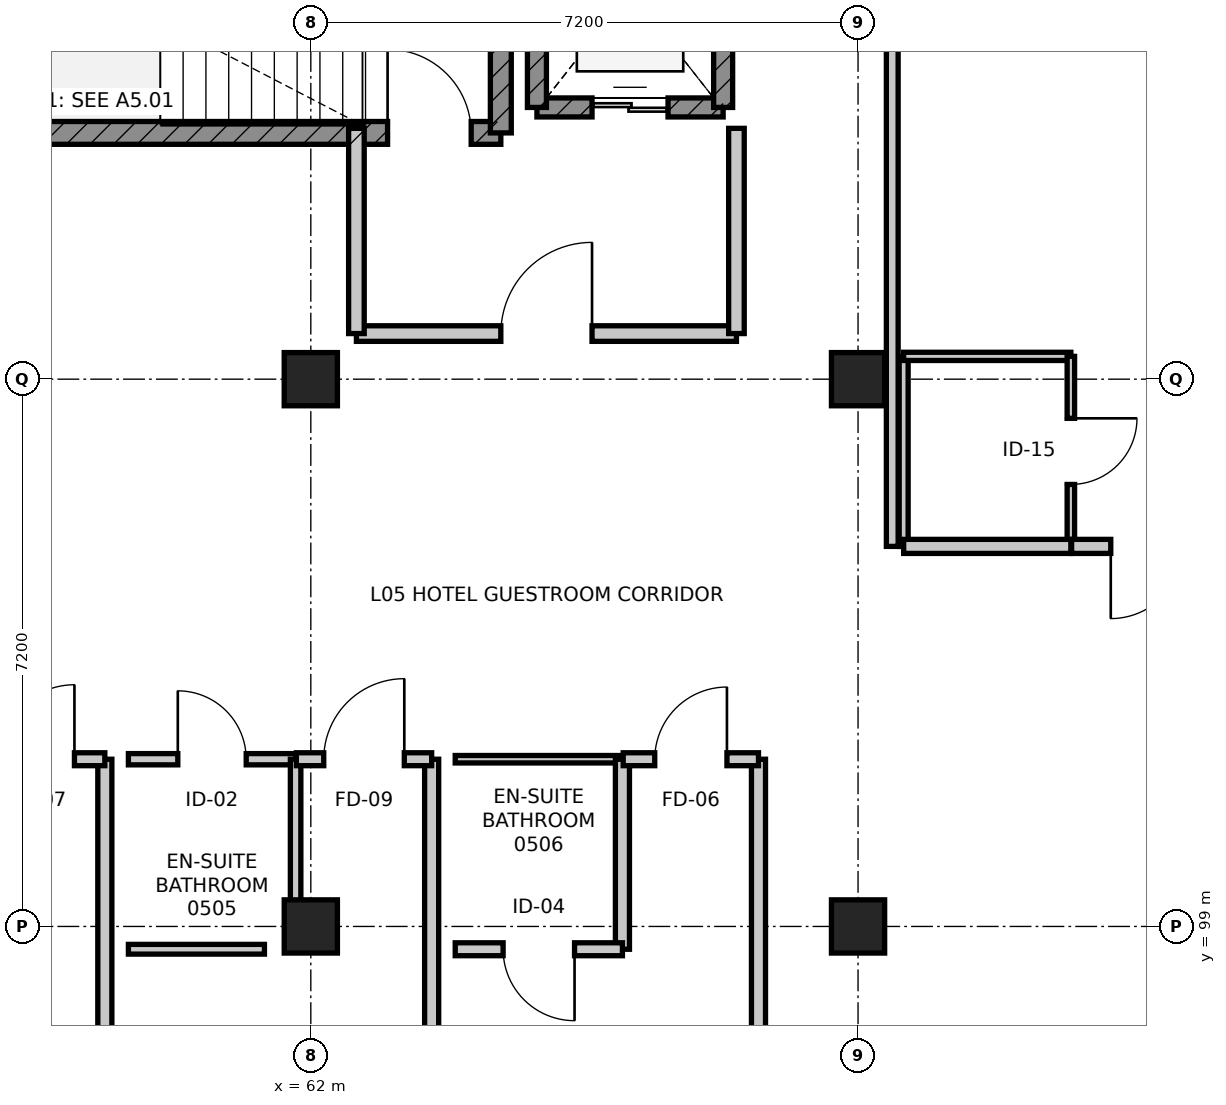
"""IFC4 building model, lengths in metres.
Left out: names, types, materials, properties, quantities, classifications, styles, units other than length and angle.
Written with IfcOpenShell. Run it as: python <this file> out.ifc"""

import sys

from ifc_helpers import new_model, si_unit, direction, frame, frame_2d, origin, origin_2d, place, context, subcontext, project, spatial, rectangle, extrude, element, fill, save


model = new_model("IFC4")
c1 = context("Model", 3, precision=1e-05, world=origin(), true_north=direction((0.0, 1.0)))
c2 = subcontext(c1, "Body", "Model", "MODEL_VIEW")
j1 = project(units=[si_unit("LENGTHUNIT", "METRE"), si_unit("PLANEANGLEUNIT", "RADIAN")], contexts=[c1])
p1 = place(None, origin())
s1 = spatial("IfcSite", under=j1, at=p1, CompositionType="ELEMENT")
p2 = place(p1, origin())
s2 = spatial("IfcBuilding", under=s1, at=p2, CompositionType="ELEMENT")
p3 = place(p2, frame((0.0, 0.0, 22.8)))
s3 = spatial("IfcBuildingStorey", under=s2, at=p3, CompositionType="ELEMENT", Elevation=22.8)
for number, where, z_axis, x_axis in (
    (1, (62.0, 99.0, 0.0), (0.0, 0.0, 1.0), (1.0, 0.0, 0.0)),
    (2, (62.0, 106.2, 0.0), (0.0, 0.0, 1.0), (1.0, 0.0, 0.0)),
    (3, (69.2, 99.0, 0.0), (0.0, 0.0, 1.0), (1.0, 0.0, 0.0)),
    (4, (69.2, 106.2, 0.0), (0.0, 0.0, 1.0), (1.0, 0.0, 0.0)),
):
    element("IfcColumn", number, at=place(p3, frame(where, z_axis=z_axis, x_axis=x_axis)), inside=s3, PredefinedType="COLUMN", context=c2, shape_type="SweptSolid", body=[
        extrude(rectangle(XDim=0.7, YDim=0.7, at=origin_2d()), origin(), (0.0, 0.0, 1.0), 3.6),
    ])
p4 = place(p3, frame((56.1, 109.44, 0.0), z_axis=(0.0, 0.0, 1.0), x_axis=(1.0, 0.0, 0.0)))
e5 = element("IfcWall", 5, at=p4, inside=s3, PredefinedType="SHEAR", context=c2, shape_type="SweptSolid", body=[
    extrude(rectangle(XDim=8.4, YDim=0.3, at=frame_2d((4.2, 0.0))), origin(), (0.0, 0.0, 1.0), 3.35),
])
p5 = place(p4, frame((6.91, 0.0, 0.0)))
e6 = element("IfcOpeningElement", 6, at=p5, cuts=e5, PredefinedType="OPENING", context=c2, shape_type="SweptSolid", body=[
    extrude(rectangle(XDim=1.1, YDim=2.1, at=frame_2d((0.55, 1.05))), frame((0.0, 0.16, 0.0), z_axis=(0.0, -1.0, 0.0), x_axis=(1.0, 0.0, 0.0)), (0.0, 0.0, 1.0), 0.32),
])
p6 = place(p3, frame((64.5, 109.44, 0.0), z_axis=(0.0, 0.0, 1.0), x_axis=(0.0, 1.0, 0.0)))
e7 = element("IfcWall", 7, at=p6, inside=s3, PredefinedType="SHEAR", context=c2, shape_type="SweptSolid", body=[
    extrude(rectangle(XDim=3.56, YDim=0.275, at=frame_2d((1.78, 0.0))), origin(), (0.0, 0.0, 1.0), 3.35),
])
p7 = place(p3, frame((64.975, 109.775, 0.0), z_axis=(0.0, 0.0, 1.0), x_axis=(1.0, 0.0, 0.0)))
e8 = element("IfcWall", 8, at=p7, inside=s3, PredefinedType="SHEAR", context=c2, shape_type="SweptSolid", body=[
    extrude(rectangle(XDim=2.45, YDim=0.25, at=frame_2d((1.225, 0.0))), origin(), (0.0, 0.0, 1.0), 3.35),
])
p8 = place(p7, frame((0.725, 0.0, 0.0)))
e9 = element("IfcOpeningElement", 9, at=p8, cuts=e8, PredefinedType="OPENING", context=c2, shape_type="SweptSolid", body=[
    extrude(rectangle(XDim=1.0, YDim=2.15, at=frame_2d((0.5, 1.075))), frame((0.0, 0.135, 0.0), z_axis=(0.0, -1.0, 0.0), x_axis=(1.0, 0.0, 0.0)), (0.0, 0.0, 1.0), 0.27),
])
for number, where, z_axis, x_axis in (
    (10, (67.425, 109.775, 0.0), (0.0, 0.0, 1.0), (0.0, 1.0, 0.0)),
    (11, (64.975, 112.825, 0.0), (0.0, 0.0, 1.0), (0.0, -1.0, 0.0)),
):
    element("IfcWall", number, at=place(p3, frame(where, z_axis=z_axis, x_axis=x_axis)), inside=s3, PredefinedType="SHEAR", context=c2, shape_type="SweptSolid", body=[
        extrude(rectangle(XDim=3.05, YDim=0.25, at=frame_2d((1.525, 0.0))), origin(), (0.0, 0.0, 1.0), 3.35),
    ])
p9 = place(p3, frame((62.6, 106.8, 0.0), z_axis=(0.0, 0.0, 1.0), x_axis=(1.0, 0.0, 0.0)))
e12 = element("IfcWall", 12, at=p9, inside=s3, PredefinedType="PARTITIONING", context=c2, shape_type="SweptSolid", body=[
    extrude(rectangle(XDim=5.0, YDim=0.205, at=frame_2d((2.5, 0.0))), origin(), (0.0, 0.0, 1.0), 3.35),
])
p10 = place(p9, frame((1.9, 0.0, 0.0)))
e13 = element("IfcOpeningElement", 13, at=p10, cuts=e12, PredefinedType="OPENING", context=c2, shape_type="SweptSolid", body=[
    extrude(rectangle(XDim=1.2, YDim=2.1, at=frame_2d((0.6, 1.05))), frame((0.0, 0.113, 0.0), z_axis=(0.0, -1.0, 0.0), x_axis=(1.0, 0.0, 0.0)), (0.0, 0.0, 1.0), 0.225),
])
for number, where, z_axis, x_axis in (
    (14, (67.6, 106.8, 0.0), (0.0, 0.0, 1.0), (0.0, 1.0, 0.0)),
    (15, (62.6, 109.5, 0.0), (0.0, 0.0, 1.0), (0.0, -1.0, 0.0)),
):
    element("IfcWall", number, at=place(p3, frame(where, z_axis=z_axis, x_axis=x_axis)), inside=s3, PredefinedType="PARTITIONING", context=c2, shape_type="SweptSolid", body=[
        extrude(rectangle(XDim=2.7, YDim=0.205, at=frame_2d((1.35, 0.0))), origin(), (0.0, 0.0, 1.0), 3.35),
    ])
p11 = place(p3, frame((59.29, 101.2, 0.0), z_axis=(0.0, 0.0, 1.0), x_axis=(0.0, -1.0, 0.0)))
e16 = element("IfcWall", 16, at=p11, inside=s3, PredefinedType="PARTITIONING", context=c2, shape_type="SweptSolid", body=[
    extrude(rectangle(XDim=9.24, YDim=0.185, at=frame_2d((4.62, 0.0))), origin(), (0.0, 0.0, 1.0), 2.735),
])
p12 = place(p3, frame((57.51, 101.2, 0.0), z_axis=(0.0, 0.0, 1.0), x_axis=(1.0, 0.0, 0.0)))
e17 = element("IfcWall", 17, at=p12, inside=s3, PredefinedType="PARTITIONING", context=c2, shape_type="SweptSolid", body=[
    extrude(rectangle(XDim=1.78, YDim=0.17, at=frame_2d((0.89, 0.0))), origin(), (0.0, 0.0, 1.0), 3.35),
])
p13 = place(p12, frame((0.4, 0.0, 0.0)))
e18 = element("IfcOpeningElement", 18, at=p13, cuts=e17, PredefinedType="OPENING", context=c2, shape_type="SweptSolid", body=[
    extrude(rectangle(XDim=0.98, YDim=2.15, at=frame_2d((0.49, 1.075))), frame((0.0, 0.095, 0.0), z_axis=(0.0, -1.0, 0.0), x_axis=(1.0, 0.0, 0.0)), (0.0, 0.0, 1.0), 0.19),
])
p14 = place(p3, frame((59.6, 101.2, 0.0), z_axis=(0.0, 0.0, 1.0), x_axis=(1.0, 0.0, 0.0)))
e19 = element("IfcWall", 19, at=p14, inside=s3, PredefinedType="PARTITIONING", context=c2, shape_type="SweptSolid", body=[
    extrude(rectangle(XDim=2.2, YDim=0.148, at=frame_2d((1.1, 0.0))), origin(), (0.0, 0.0, 1.0), 2.685),
])
p15 = place(p14, frame((0.65, 0.0, 0.0)))
e20 = element("IfcOpeningElement", 20, at=p15, cuts=e19, PredefinedType="OPENING", context=c2, shape_type="SweptSolid", body=[
    extrude(rectangle(XDim=0.9, YDim=2.08, at=frame_2d((0.45, 1.04))), frame((0.0, 0.084, 0.0), z_axis=(0.0, -1.0, 0.0), x_axis=(1.0, 0.0, 0.0)), (0.0, 0.0, 1.0), 0.168),
])
p16 = place(p3, frame((61.8, 101.2, 0.0), z_axis=(0.0, 0.0, 1.0), x_axis=(0.0, -1.0, 0.0)))
e21 = element("IfcWall", 21, at=p16, inside=s3, PredefinedType="PARTITIONING", context=c2, shape_type="SweptSolid", body=[
    extrude(rectangle(XDim=2.09, YDim=0.138, at=frame_2d((1.045, 0.0))), origin(), (0.0, 0.0, 1.0), 2.685),
])
p17 = place(p3, frame((61.39, 98.7, 0.0), z_axis=(0.0, 0.0, 1.0), x_axis=(-1.0, 0.0, 0.0)))
e22 = element("IfcWall", 22, at=p17, inside=s3, PredefinedType="PARTITIONING", context=c2, shape_type="SweptSolid", body=[
    extrude(rectangle(XDim=1.79, YDim=0.128, at=frame_2d((0.895, 0.0))), origin(), (0.0, 0.0, 1.0), 3.35),
])
p18 = place(p3, frame((63.59, 101.2, 0.0), z_axis=(0.0, 0.0, 1.0), x_axis=(0.0, -1.0, 0.0)))
e23 = element("IfcWall", 23, at=p18, inside=s3, PredefinedType="PARTITIONING", context=c2, shape_type="SweptSolid", body=[
    extrude(rectangle(XDim=9.24, YDim=0.185, at=frame_2d((4.62, 0.0))), origin(), (0.0, 0.0, 1.0), 2.735),
])
p19 = place(p3, frame((61.81, 101.2, 0.0), z_axis=(0.0, 0.0, 1.0), x_axis=(1.0, 0.0, 0.0)))
e24 = element("IfcWall", 24, at=p19, inside=s3, PredefinedType="PARTITIONING", context=c2, shape_type="SweptSolid", body=[
    extrude(rectangle(XDim=1.78, YDim=0.17, at=frame_2d((0.89, 0.0))), origin(), (0.0, 0.0, 1.0), 2.685),
])
p20 = place(p19, frame((0.36, 0.0, 0.0)))
e25 = element("IfcOpeningElement", 25, at=p20, cuts=e24, PredefinedType="OPENING", context=c2, shape_type="SweptSolid", body=[
    extrude(rectangle(XDim=1.06, YDim=2.2, at=frame_2d((0.53, 1.1))), frame((0.0, 0.095, 0.0), z_axis=(0.0, -1.0, 0.0), x_axis=(1.0, 0.0, 0.0)), (0.0, 0.0, 1.0), 0.19),
])
p21 = place(p3, frame((63.9, 101.2, 0.0), z_axis=(0.0, 0.0, 1.0), x_axis=(1.0, 0.0, 0.0)))
e26 = element("IfcWall", 26, at=p21, inside=s3, PredefinedType="PARTITIONING", context=c2, shape_type="SweptSolid", body=[
    extrude(rectangle(XDim=2.2, YDim=0.098, at=frame_2d((1.1, 0.0))), origin(), (0.0, 0.0, 1.0), 3.35),
])
p22 = place(p3, frame((66.1, 101.2, 0.0), z_axis=(0.0, 0.0, 1.0), x_axis=(0.0, -1.0, 0.0)))
e27 = element("IfcWall", 27, at=p22, inside=s3, PredefinedType="PARTITIONING", context=c2, shape_type="SweptSolid", body=[
    extrude(rectangle(XDim=2.5, YDim=0.185, at=frame_2d((1.25, 0.0))), origin(), (0.0, 0.0, 1.0), 2.735),
])
p23 = place(p3, frame((66.1, 98.7, 0.0), z_axis=(0.0, 0.0, 1.0), x_axis=(-1.0, 0.0, 0.0)))
e28 = element("IfcWall", 28, at=p23, inside=s3, PredefinedType="PARTITIONING", context=c2, shape_type="SweptSolid", body=[
    extrude(rectangle(XDim=2.2, YDim=0.17, at=frame_2d((1.1, 0.0))), origin(), (0.0, 0.0, 1.0), 2.735),
])
p24 = place(p23, frame((0.63, 0.0, 0.0)))
e29 = element("IfcOpeningElement", 29, at=p24, cuts=e28, PredefinedType="OPENING", context=c2, shape_type="SweptSolid", body=[
    extrude(rectangle(XDim=0.94, YDim=2.12, at=frame_2d((0.47, 1.06))), frame((0.0, 0.095, 0.0), z_axis=(0.0, -1.0, 0.0), x_axis=(1.0, 0.0, 0.0)), (0.0, 0.0, 1.0), 0.19),
])
p25 = place(p3, frame((67.89, 101.2, 0.0), z_axis=(0.0, 0.0, 1.0), x_axis=(0.0, -1.0, 0.0)))
e30 = element("IfcWall", 30, at=p25, inside=s3, PredefinedType="PARTITIONING", context=c2, shape_type="SweptSolid", body=[
    extrude(rectangle(XDim=9.24, YDim=0.185, at=frame_2d((4.62, 0.0))), origin(), (0.0, 0.0, 1.0), 2.735),
])
p26 = place(p3, frame((66.11, 101.2, 0.0), z_axis=(0.0, 0.0, 1.0), x_axis=(1.0, 0.0, 0.0)))
e31 = element("IfcWall", 31, at=p26, inside=s3, PredefinedType="PARTITIONING", context=c2, shape_type="SweptSolid", body=[
    extrude(rectangle(XDim=1.78, YDim=0.17, at=frame_2d((0.89, 0.0))), origin(), (0.0, 0.0, 1.0), 3.35),
])
p27 = place(p26, frame((0.415, 0.0, 0.0)))
e32 = element("IfcOpeningElement", 32, at=p27, cuts=e31, PredefinedType="OPENING", context=c2, shape_type="SweptSolid", body=[
    extrude(rectangle(XDim=0.95, YDim=2.1, at=frame_2d((0.475, 1.05))), frame((0.0, 0.095, 0.0), z_axis=(0.0, -1.0, 0.0), x_axis=(1.0, 0.0, 0.0)), (0.0, 0.0, 1.0), 0.19),
])
p28 = place(p3, frame((69.8, 104.0, 0.0), z_axis=(0.0, 0.0, 1.0), x_axis=(0.0, 1.0, 0.0)))
e33 = element("IfcWall", 33, at=p28, inside=s3, PredefinedType="PARTITIONING", context=c2, shape_type="SweptSolid", body=[
    extrude(rectangle(XDim=2.5, YDim=0.118, at=frame_2d((1.25, 0.0))), origin(), (0.0, 0.0, 1.0), 2.735),
])
p29 = place(p3, frame((69.8, 106.5, 0.0), z_axis=(0.0, 0.0, 1.0), x_axis=(1.0, 0.0, 0.0)))
e34 = element("IfcWall", 34, at=p29, inside=s3, PredefinedType="PARTITIONING", context=c2, shape_type="SweptSolid", body=[
    extrude(rectangle(XDim=2.2, YDim=0.108, at=frame_2d((1.1, 0.0))), origin(), (0.0, 0.0, 1.0), 3.35),
])
p30 = place(p3, frame((72.0, 106.5, 0.0), z_axis=(0.0, 0.0, 1.0), x_axis=(0.0, -1.0, 0.0)))
e35 = element("IfcWall", 35, at=p30, inside=s3, PredefinedType="PARTITIONING", context=c2, shape_type="SweptSolid", body=[
    extrude(rectangle(XDim=2.5, YDim=0.098, at=frame_2d((1.25, 0.0))), origin(), (0.0, 0.0, 1.0), 2.735),
])
p31 = place(p30, frame((0.815, 0.0, 0.0)))
e36 = element("IfcOpeningElement", 36, at=p31, cuts=e35, PredefinedType="OPENING", context=c2, shape_type="SweptSolid", body=[
    extrude(rectangle(XDim=0.87, YDim=2.07, at=frame_2d((0.435, 1.035))), frame((0.0, 0.059, 0.0), z_axis=(0.0, -1.0, 0.0), x_axis=(1.0, 0.0, 0.0)), (0.0, 0.0, 1.0), 0.118),
])
p32 = place(p3, frame((72.0, 104.0, 0.0), z_axis=(0.0, 0.0, 1.0), x_axis=(-1.0, 0.0, 0.0)))
e37 = element("IfcWall", 37, at=p32, inside=s3, PredefinedType="PARTITIONING", context=c2, shape_type="SweptSolid", body=[
    extrude(rectangle(XDim=2.2, YDim=0.185, at=frame_2d((1.1, 0.0))), origin(), (0.0, 0.0, 1.0), 3.35),
])
p33 = place(p3, frame((69.65, 104.0, 0.0), z_axis=(0.0, 0.0, 1.0), x_axis=(0.0, 1.0, 0.0)))
e38 = element("IfcWall", 38, at=p33, inside=s3, PredefinedType="PARTITIONING", context=c2, shape_type="SweptSolid", body=[
    extrude(rectangle(XDim=11.152, YDim=0.155, at=frame_2d((5.576, 0.0))), origin(), (0.0, 0.0, 1.0), 2.735),
])
p34 = place(p3, frame((73.99, 104.0, 0.0), z_axis=(0.0, 0.0, 1.0), x_axis=(-1.0, 0.0, 0.0)))
e39 = element("IfcWall", 39, at=p34, inside=s3, PredefinedType="PARTITIONING", context=c2, shape_type="SweptSolid", body=[
    extrude(rectangle(XDim=1.98, YDim=0.185, at=frame_2d((0.99, 0.0))), origin(), (0.0, 0.0, 1.0), 3.35),
])
p35 = place(p34, frame((0.515, 0.0, 0.0)))
e40 = element("IfcOpeningElement", 40, at=p35, cuts=e39, PredefinedType="OPENING", context=c2, shape_type="SweptSolid", body=[
    extrude(rectangle(XDim=0.95, YDim=2.1, at=frame_2d((0.475, 1.05))), frame((0.0, 0.103, 0.0), z_axis=(0.0, -1.0, 0.0), x_axis=(1.0, 0.0, 0.0)), (0.0, 0.0, 1.0), 0.205),
])
p36 = place(p5, origin())
e41 = element("IfcDoor", 41, at=p36, inside=s3, OperationType="SINGLE_SWING_LEFT", PredefinedType="DOOR", context=c2, shape_type="SweptSolid", body=[
    extrude(rectangle(XDim=1.1, YDim=2.1, at=frame_2d((0.55, 1.05))), frame((0.0, 0.025, 0.0), z_axis=(0.0, -1.0, 0.0), x_axis=(1.0, 0.0, 0.0)), (0.0, 0.0, 1.0), 0.05),
])
fill(e6, e41)
p37 = place(p8, origin())
e42 = element("IfcDoor", 42, at=p37, inside=s3, OperationType="DOUBLE_DOOR_SLIDING", PredefinedType="DOOR", context=c2, shape_type="SweptSolid", body=[
    extrude(rectangle(XDim=1.0, YDim=2.15, at=frame_2d((0.5, 1.075))), frame((0.0, 0.025, 0.0), z_axis=(0.0, -1.0, 0.0), x_axis=(1.0, 0.0, 0.0)), (0.0, 0.0, 1.0), 0.05),
])
fill(e9, e42)
p38 = place(p10, origin())
e43 = element("IfcDoor", 43, at=p38, inside=s3, OperationType="SINGLE_SWING_RIGHT", PredefinedType="DOOR", context=c2, shape_type="SweptSolid", body=[
    extrude(rectangle(XDim=1.2, YDim=2.1, at=frame_2d((0.6, 1.05))), frame((0.0, 0.025, 0.0), z_axis=(0.0, -1.0, 0.0), x_axis=(1.0, 0.0, 0.0)), (0.0, 0.0, 1.0), 0.05),
])
fill(e13, e43)
p39 = place(p13, origin())
e44 = element("IfcDoor", 44, at=p39, inside=s3, OperationType="SINGLE_SWING_RIGHT", PredefinedType="DOOR", context=c2, shape_type="SweptSolid", body=[
    extrude(rectangle(XDim=0.98, YDim=2.15, at=frame_2d((0.49, 1.075))), frame((0.0, 0.025, 0.0), z_axis=(0.0, -1.0, 0.0), x_axis=(1.0, 0.0, 0.0)), (0.0, 0.0, 1.0), 0.05),
])
fill(e18, e44)
p40 = place(p15, origin())
e45 = element("IfcDoor", 45, at=p40, inside=s3, OperationType="SINGLE_SWING_LEFT", PredefinedType="DOOR", context=c2, shape_type="SweptSolid", body=[
    extrude(rectangle(XDim=0.9, YDim=2.08, at=frame_2d((0.45, 1.04))), frame((0.0, 0.025, 0.0), z_axis=(0.0, -1.0, 0.0), x_axis=(1.0, 0.0, 0.0)), (0.0, 0.0, 1.0), 0.05),
])
fill(e20, e45)
p41 = place(p20, origin())
e46 = element("IfcDoor", 46, at=p41, inside=s3, OperationType="SINGLE_SWING_RIGHT", PredefinedType="DOOR", context=c2, shape_type="SweptSolid", body=[
    extrude(rectangle(XDim=1.06, YDim=2.2, at=frame_2d((0.53, 1.1))), frame((0.0, 0.025, 0.0), z_axis=(0.0, -1.0, 0.0), x_axis=(1.0, 0.0, 0.0)), (0.0, 0.0, 1.0), 0.05),
])
fill(e25, e46)
p42 = place(p24, origin())
e47 = element("IfcDoor", 47, at=p42, inside=s3, OperationType="SINGLE_SWING_LEFT", PredefinedType="DOOR", context=c2, shape_type="SweptSolid", body=[
    extrude(rectangle(XDim=0.94, YDim=2.12, at=frame_2d((0.47, 1.06))), frame((0.0, 0.025, 0.0), z_axis=(0.0, -1.0, 0.0), x_axis=(1.0, 0.0, 0.0)), (0.0, 0.0, 1.0), 0.05),
])
fill(e29, e47)
p43 = place(p27, origin())
e48 = element("IfcDoor", 48, at=p43, inside=s3, OperationType="SINGLE_SWING_RIGHT", PredefinedType="DOOR", context=c2, shape_type="SweptSolid", body=[
    extrude(rectangle(XDim=0.95, YDim=2.1, at=frame_2d((0.475, 1.05))), frame((0.0, 0.025, 0.0), z_axis=(0.0, -1.0, 0.0), x_axis=(1.0, 0.0, 0.0)), (0.0, 0.0, 1.0), 0.05),
])
fill(e32, e48)
p44 = place(p31, origin())
e49 = element("IfcDoor", 49, at=p44, inside=s3, OperationType="SINGLE_SWING_LEFT", PredefinedType="DOOR", context=c2, shape_type="SweptSolid", body=[
    extrude(rectangle(XDim=0.87, YDim=2.07, at=frame_2d((0.435, 1.035))), frame((0.0, 0.025, 0.0), z_axis=(0.0, -1.0, 0.0), x_axis=(1.0, 0.0, 0.0)), (0.0, 0.0, 1.0), 0.05),
])
fill(e36, e49)
p45 = place(p35, origin())
e50 = element("IfcDoor", 50, at=p45, inside=s3, OperationType="SINGLE_SWING_RIGHT", PredefinedType="DOOR", context=c2, shape_type="SweptSolid", body=[
    extrude(rectangle(XDim=0.95, YDim=2.1, at=frame_2d((0.475, 1.05))), frame((0.0, 0.025, 0.0), z_axis=(0.0, -1.0, 0.0), x_axis=(1.0, 0.0, 0.0)), (0.0, 0.0, 1.0), 0.05),
])
fill(e40, e50)
save(model, sys.argv[1])
